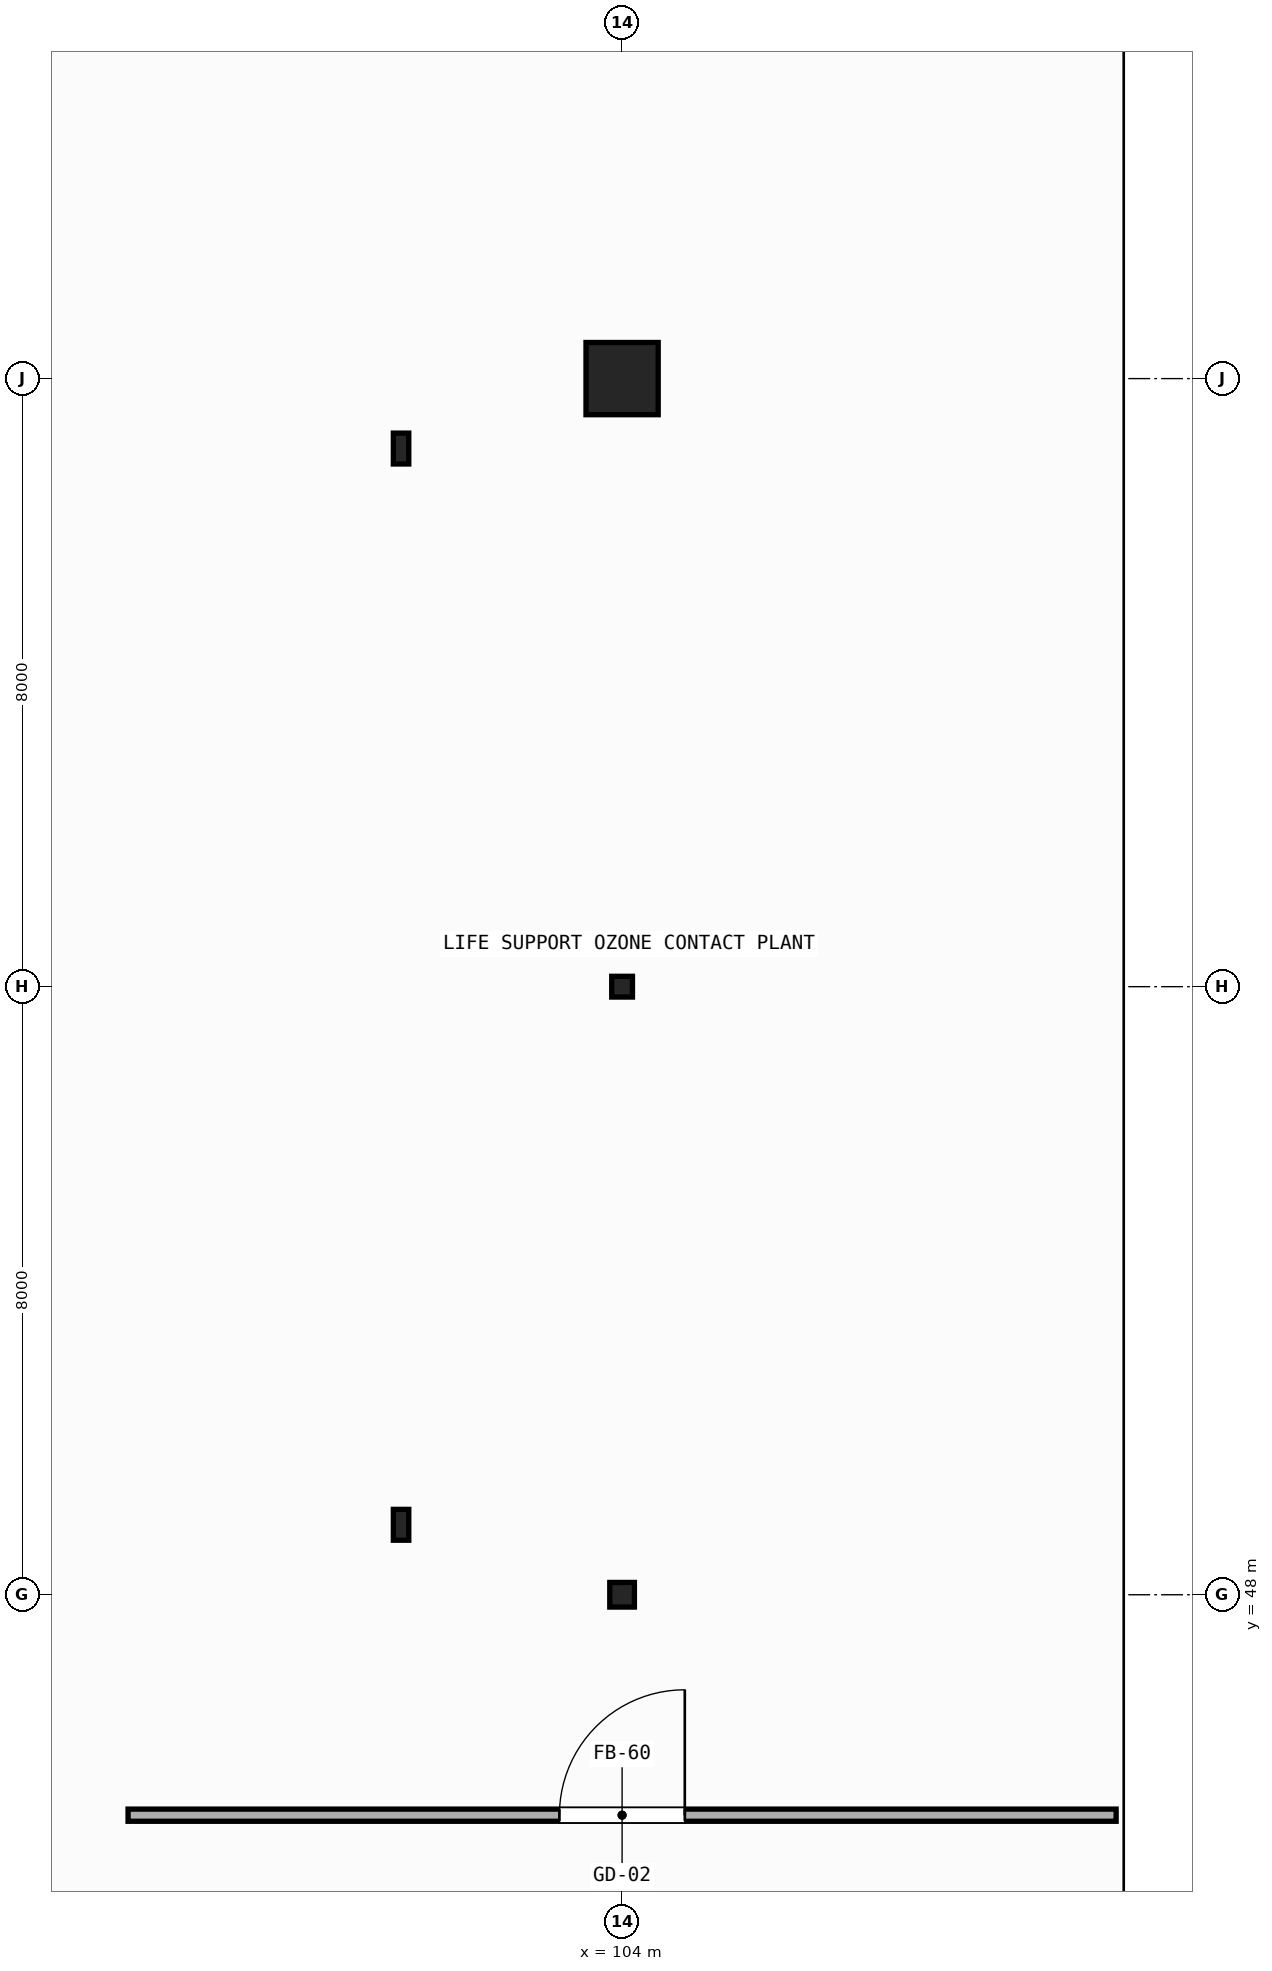
"""IFC4 building model, lengths in metres.
Left out: names, types, materials, properties, quantities, classifications, styles, units other than length and angle.
Written with IfcOpenShell. Run it as: python <this file> out.ifc"""

import sys

from ifc_helpers import new_model, si_unit, direction, frame, frame_2d, origin, origin_2d, place, context, subcontext, project, spatial, rectangle, hollow_rectangle, hollow_circle, extrude, element, fill, save


model = new_model("IFC4")
c1 = context("Model", 3, precision=1e-05, world=origin(), true_north=direction((0.0, 1.0)))
c2 = subcontext(c1, "Body", "Model", "MODEL_VIEW")
j1 = project(units=[si_unit("LENGTHUNIT", "METRE"), si_unit("PLANEANGLEUNIT", "RADIAN")], contexts=[c1])
p1 = place(None, origin())
s1 = spatial("IfcSite", under=j1, at=p1, CompositionType="ELEMENT")
p2 = place(p1, origin())
s2 = spatial("IfcBuilding", under=s1, at=p2, CompositionType="ELEMENT")
p3 = place(p2, frame((0.0, 0.0, -5.4)))
s3 = spatial("IfcBuildingStorey", under=s2, at=p3, CompositionType="ELEMENT", Elevation=-5.4)
p4 = place(p3, frame((104.0, 48.0, 0.0), z_axis=(0.0, 0.0, 1.0), x_axis=(1.0, 0.0, 0.0)))
e1 = element("IfcColumn", 1, at=p4, inside=s3, PredefinedType="COLUMN", context=c2, shape_type="SweptSolid", body=[
    extrude(hollow_circle(Radius=0.162, WallThickness=0.012, at=origin_2d()), origin(), (0.0, 0.0, 1.0), 5.04),
])
p5 = place(p3, frame((104.0, 56.0, 0.0), z_axis=(0.0, 0.0, 1.0), x_axis=(0.0, 1.0, 0.0)))
e2 = element("IfcColumn", 2, at=p5, inside=s3, PredefinedType="COLUMN", context=c2, shape_type="SweptSolid", body=[
    extrude(hollow_circle(Radius=0.136, WallThickness=0.012, at=origin_2d()), origin(), (0.0, 0.0, 1.0), 5.04),
])
p6 = place(p3, frame((104.0, 64.0, 0.0), z_axis=(0.0, 0.0, 1.0), x_axis=(1.0, 0.0, 0.0)))
e3 = element("IfcColumn", 3, at=p6, inside=s3, PredefinedType="COLUMN", context=c2, shape_type="SweptSolid", body=[
    extrude(rectangle(XDim=0.95, YDim=0.95, at=origin_2d()), origin(), (0.0, 0.0, 1.0), 5.04),
])
for number, where, z_axis, x_axis in (
    (4, (101.092, 63.08, 0.0), (0.0, 0.0, 1.0), (1.0, 0.0, 0.0)),
    (5, (101.092, 48.92, 0.0), (0.0, 0.0, 1.0), (1.0, 0.0, 0.0)),
):
    element("IfcColumn", number, at=place(p3, frame(where, z_axis=z_axis, x_axis=x_axis)), inside=s3, PredefinedType="COLUMN", context=c2, shape_type="SweptSolid", body=[
        extrude(hollow_rectangle(XDim=0.203, YDim=0.406, WallThickness=0.012, InnerFilletRadius=0.012, OuterFilletRadius=0.024, at=origin_2d()), origin(), (0.0, 0.0, 1.0), 5.02),
    ])
p7 = place(p3, frame((97.5, 45.1, 0.0), z_axis=(0.0, 0.0, 1.0), x_axis=(1.0, 0.0, 0.0)))
e6 = element("IfcWall", 6, at=p7, inside=s3, PredefinedType="PARTITIONING", context=c2, shape_type="SweptSolid", body=[
    extrude(rectangle(XDim=13.0, YDim=0.16, at=frame_2d((6.5, 0.0))), origin(), (0.0, 0.0, 1.0), 4.29),
])
p8 = place(p7, frame((5.675, 0.0, 0.0)))
e7 = element("IfcOpeningElement", 7, at=p8, cuts=e6, PredefinedType="OPENING", context=c2, shape_type="SweptSolid", body=[
    extrude(rectangle(XDim=1.65, YDim=2.35, at=frame_2d((0.825, 1.175))), frame((0.0, 0.09, 0.0), z_axis=(0.0, -1.0, 0.0), x_axis=(1.0, 0.0, 0.0)), (0.0, 0.0, 1.0), 0.18),
])
p9 = place(p8, origin())
e8 = element("IfcDoor", 8, at=p9, inside=s3, OperationType="SINGLE_SWING_RIGHT", PredefinedType="DOOR", context=c2, shape_type="SweptSolid", body=[
    extrude(rectangle(XDim=1.65, YDim=2.35, at=frame_2d((0.825, 1.175))), frame((0.0, 0.025, 0.0), z_axis=(0.0, -1.0, 0.0), x_axis=(1.0, 0.0, 0.0)), (0.0, 0.0, 1.0), 0.05),
])
fill(e7, e8)
save(model, sys.argv[1])
